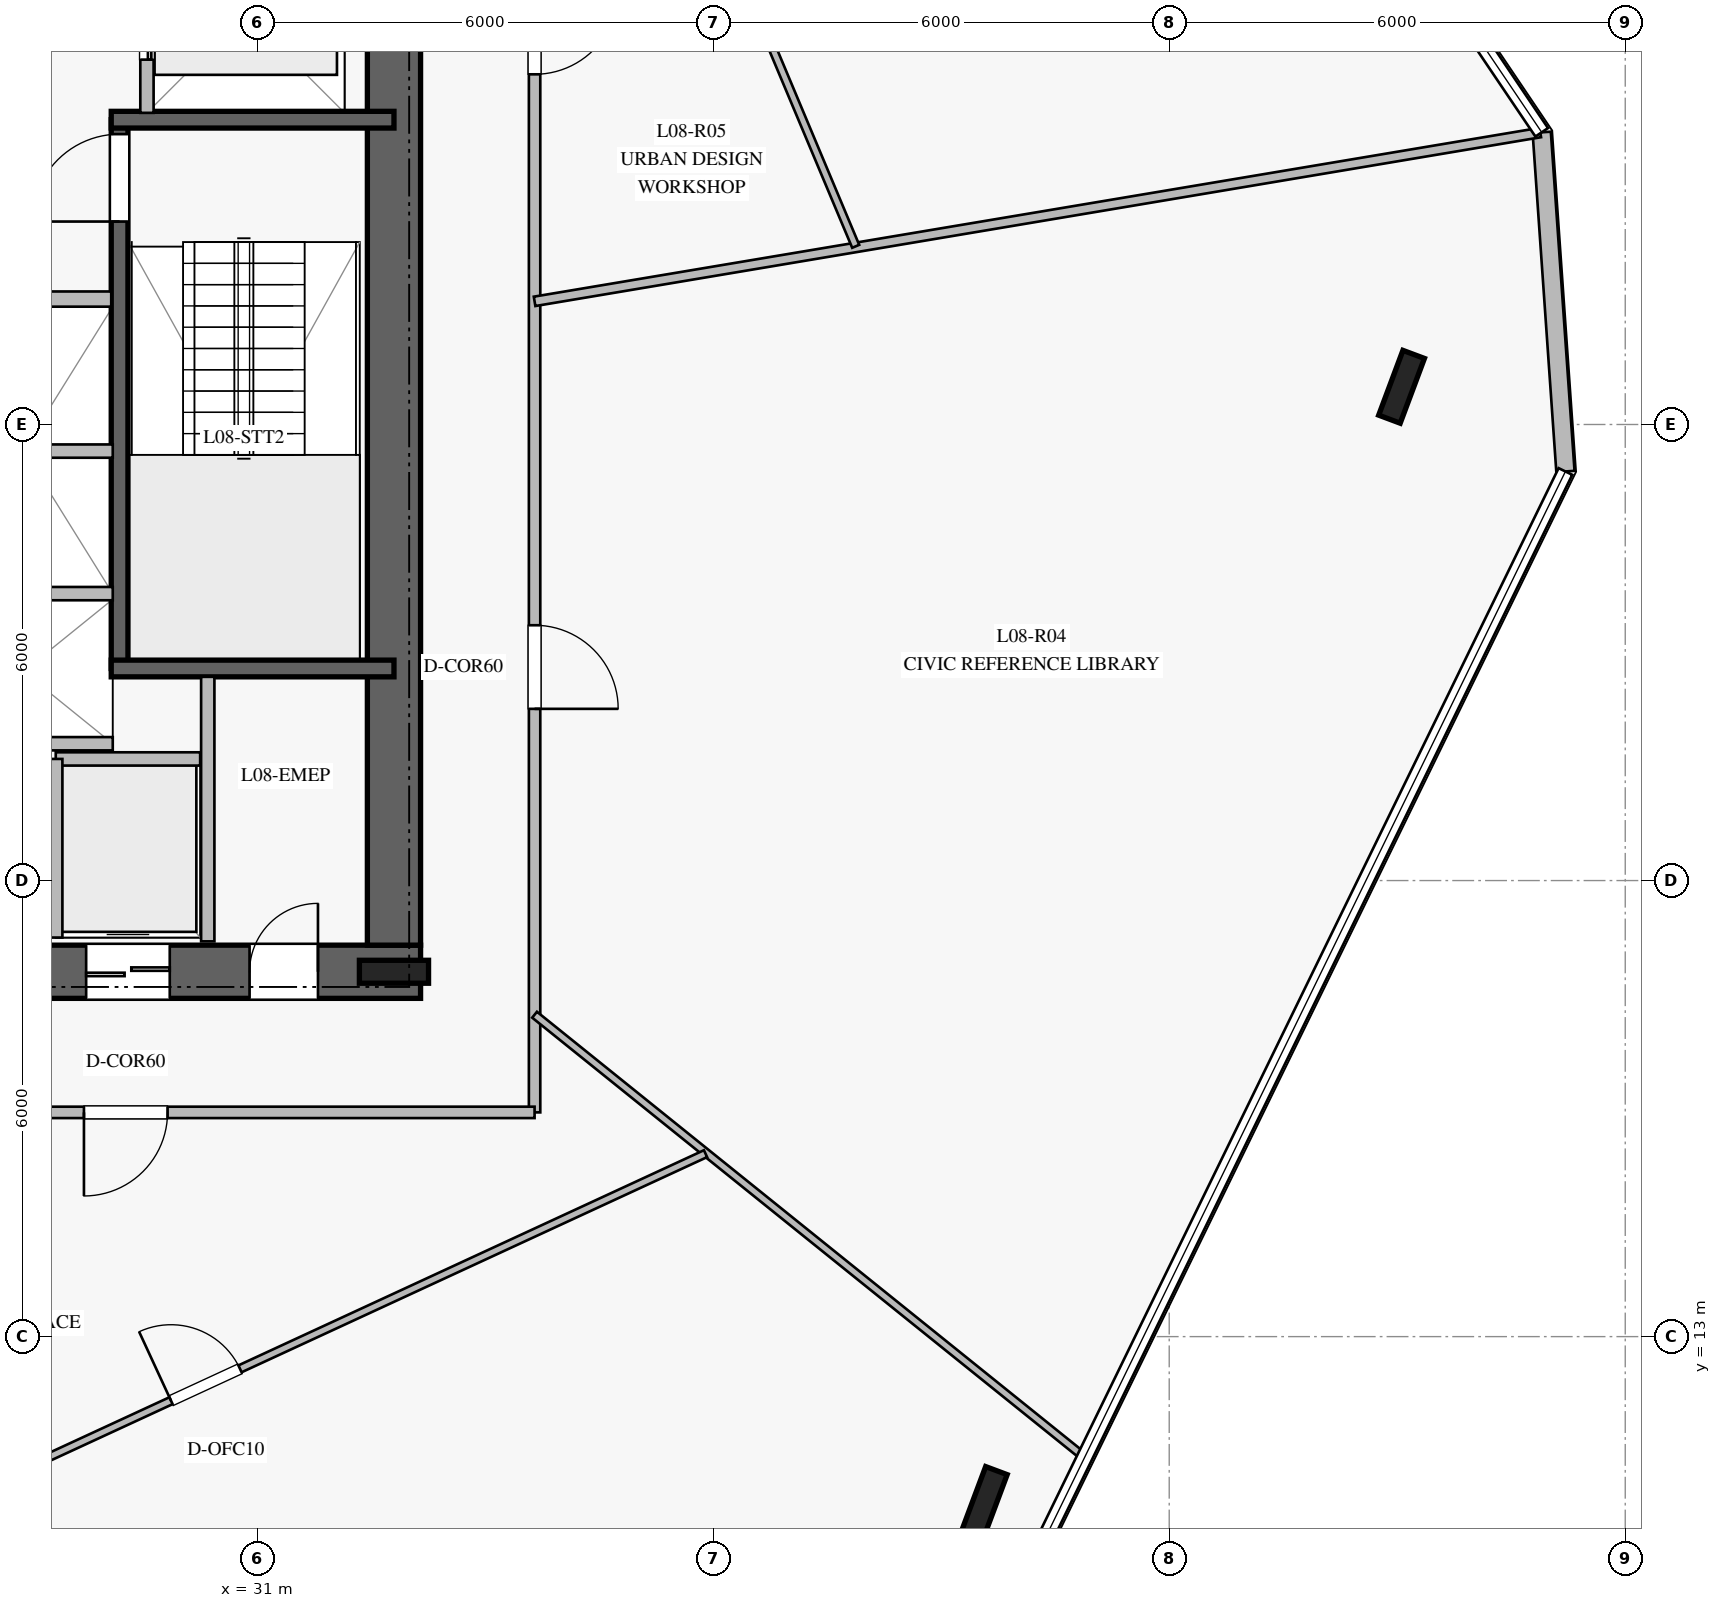
"""IFC4 building model, lengths in metres.
Left out: names, types, materials, properties, quantities, classifications, styles, units other than length and angle.
Written with IfcOpenShell. Run it as: python <this file> out.ifc"""

import sys

from ifc_helpers import new_model, si_unit, direction, frame, frame_2d, origin, origin_2d, place, context, subcontext, project, spatial, rectangle, i_section, extrude, element, fill, save


model = new_model("IFC4")
c1 = context("Model", 3, precision=1e-05, world=origin(), true_north=direction((0.0, 1.0)))
c2 = subcontext(c1, "Body", "Model", "MODEL_VIEW")
j1 = project(units=[si_unit("LENGTHUNIT", "METRE"), si_unit("PLANEANGLEUNIT", "RADIAN")], contexts=[c1])
p1 = place(None, origin())
s1 = spatial("IfcSite", under=j1, at=p1, CompositionType="ELEMENT")
p2 = place(p1, origin())
s2 = spatial("IfcBuilding", under=s1, at=p2, CompositionType="ELEMENT")
p3 = place(p2, frame((0.0, 0.0, 36.0)))
s3 = spatial("IfcBuildingStorey", under=s2, at=p3, CompositionType="ELEMENT", Elevation=36.0)
p4 = place(p3, frame((16.85, 17.8, 0.0), z_axis=(0.0, 0.0, 1.0), x_axis=(1.0, 0.0, 0.0)))
e1 = element("IfcWall", 1, at=p4, inside=s3, PredefinedType="SHEAR", context=c2, shape_type="SweptSolid", body=[
    extrude(rectangle(XDim=16.3, YDim=0.7, at=frame_2d((8.15, 0.0))), origin(), (0.0, 0.0, 1.0), 3.76),
])
p5 = place(p4, frame((5.1, 0.0, 0.0)))
e2 = element("IfcOpeningElement", 2, at=p5, cuts=e1, PredefinedType="OPENING", context=c2, shape_type="SweptSolid", body=[
    extrude(rectangle(XDim=1.2, YDim=2.25, at=frame_2d((0.6, 1.125))), frame((0.0, 0.36, 0.0), z_axis=(0.0, -1.0, 0.0), x_axis=(1.0, 0.0, 0.0)), (0.0, 0.0, 1.0), 0.72),
])
p6 = place(p4, frame((14.05, 0.0, 0.0)))
e3 = element("IfcOpeningElement", 3, at=p6, cuts=e1, PredefinedType="OPENING", context=c2, shape_type="SweptSolid", body=[
    extrude(rectangle(XDim=0.9, YDim=2.1, at=frame_2d((0.45, 1.05))), frame((0.0, 0.36, 0.0), z_axis=(0.0, -1.0, 0.0), x_axis=(1.0, 0.0, 0.0)), (0.0, 0.0, 1.0), 0.72),
])
p7 = place(p4, frame((7.95, 0.0, 0.0)))
e4 = element("IfcOpeningElement", 4, at=p7, cuts=e1, PredefinedType="OPENING", context=c2, shape_type="SweptSolid", body=[
    extrude(rectangle(XDim=1.1, YDim=2.2, at=frame_2d((0.55, 1.1))), frame((0.0, 0.36, 0.0), z_axis=(0.0, -1.0, 0.0), x_axis=(1.0, 0.0, 0.0)), (0.0, 0.0, 1.0), 0.72),
])
p8 = place(p4, frame((9.925, 0.0, 0.0)))
e5 = element("IfcOpeningElement", 5, at=p8, cuts=e1, PredefinedType="OPENING", context=c2, shape_type="SweptSolid", body=[
    extrude(rectangle(XDim=1.1, YDim=2.2, at=frame_2d((0.55, 1.1))), frame((0.0, 0.36, 0.0), z_axis=(0.0, -1.0, 0.0), x_axis=(1.0, 0.0, 0.0)), (0.0, 0.0, 1.0), 0.72),
])
p9 = place(p4, frame((11.9, 0.0, 0.0)))
e6 = element("IfcOpeningElement", 6, at=p9, cuts=e1, PredefinedType="OPENING", context=c2, shape_type="SweptSolid", body=[
    extrude(rectangle(XDim=1.1, YDim=2.2, at=frame_2d((0.55, 1.1))), frame((0.0, 0.36, 0.0), z_axis=(0.0, -1.0, 0.0), x_axis=(1.0, 0.0, 0.0)), (0.0, 0.0, 1.0), 0.72),
])
p10 = place(p3, frame((32.8, 18.15, 0.0), z_axis=(0.0, 0.0, 1.0), x_axis=(0.0, 1.0, 0.0)))
e7 = element("IfcWall", 7, at=p10, inside=s3, PredefinedType="SHEAR", context=c2, shape_type="SweptSolid", body=[
    extrude(rectangle(XDim=13.7, YDim=0.7, at=frame_2d((6.85, 0.0))), origin(), (0.0, 0.0, 1.0), 3.76),
])
p11 = place(p3, frame((32.8, 17.8, 0.0), z_axis=(0.0, 0.0, 1.0), x_axis=(1.0, 0.0, 0.0)))
e8 = element("IfcColumn", 8, at=p11, inside=s3, PredefinedType="COLUMN", context=c2, shape_type="SweptSolid", body=[
    extrude(i_section(OverallWidth=0.302, OverallDepth=0.91, WebThickness=0.021, FlangeThickness=0.04, at=origin_2d()), origin(), (0.0, 0.0, 1.0), 4.0),
])
p12 = place(p3, frame((29.19, 21.79, 0.0), z_axis=(0.0, 0.0, 1.0), x_axis=(0.0, 1.0, 0.0)))
e9 = element("IfcWall", 9, at=p12, inside=s3, PredefinedType="SOLIDWALL", context=c2, shape_type="SweptSolid", body=[
    extrude(rectangle(XDim=7.22, YDim=0.22, at=frame_2d((3.61, 0.0))), origin(), (0.0, 0.0, 1.0), 3.76),
])
p13 = place(p12, frame((5.88, 0.0, 0.0)))
e10 = element("IfcOpeningElement", 10, at=p13, cuts=e9, PredefinedType="OPENING", context=c2, shape_type="SweptSolid", body=[
    extrude(rectangle(XDim=1.15, YDim=2.2, at=frame_2d((0.575, 1.1))), frame((0.0, 0.12, 0.0), z_axis=(0.0, -1.0, 0.0), x_axis=(1.0, 0.0, 0.0)), (0.0, 0.0, 1.0), 0.24),
])
for number, where, z_axis, x_axis in (
    (11, (29.08, 21.79, 0.0), (0.0, 0.0, 1.0), (1.0, 0.0, 0.0)),
    (12, (29.08, 29.01, 0.0), (0.0, 0.0, 1.0), (1.0, 0.0, 0.0)),
):
    element("IfcWall", number, at=place(p3, frame(where, z_axis=z_axis, x_axis=x_axis)), inside=s3, PredefinedType="SOLIDWALL", context=c2, shape_type="SweptSolid", body=[
        extrude(rectangle(XDim=3.72, YDim=0.22, at=frame_2d((1.86, 0.0))), origin(), (0.0, 0.0, 1.0), 3.76),
    ])
for number, where, z_axis, x_axis in (
    (13, (40.567, 10.811, 0.0), (0.0, 0.0, 1.0), (0.35, 0.937, 0.0)),
    (14, (46.057, 25.496, 0.0), (0.0, 0.0, 1.0), (0.35, 0.937, 0.0)),
):
    element("IfcColumn", number, at=place(p3, frame(where, z_axis=z_axis, x_axis=x_axis)), inside=s3, PredefinedType="COLUMN", context=c2, shape_type="SweptSolid", body=[
        extrude(i_section(OverallWidth=0.302, OverallDepth=0.91, WebThickness=0.021, FlangeThickness=0.04, at=origin_2d()), origin(), (0.0, 0.0, 1.0), 4.0),
    ])
p14 = place(p3, frame((48.213, 24.382, 0.0), z_axis=(0.0, 0.0, 1.0), x_axis=(-0.069757428916, 0.997563983467, 0.0)))
e15 = element("IfcWall", 15, at=p14, inside=s3, PredefinedType="STANDARD", context=c2, shape_type="SweptSolid", body=[
    extrude(rectangle(XDim=4.473, YDim=0.24, at=frame_2d((2.236, 0.0))), origin(), (0.0, 0.0, 1.0), 3.76),
])
p15 = place(p3, frame((25.7, 26.65, 0.0), z_axis=(0.0, 0.0, 1.0), x_axis=(1.0, 0.0, 0.0)))
e16 = element("IfcWall", 16, at=p15, inside=s3, PredefinedType="PARTITIONING", context=c2, shape_type="SweptSolid", body=[
    extrude(rectangle(XDim=3.38, YDim=0.2, at=frame_2d((1.69, 0.0))), origin(), (0.0, 0.0, 1.0), 3.76),
])
p16 = place(p3, frame((30.35, 18.2, 0.0), z_axis=(0.0, 0.0, 1.0), x_axis=(0.0, 1.0, 0.0)))
e17 = element("IfcWall", 17, at=p16, inside=s3, PredefinedType="PARTITIONING", context=c2, shape_type="SweptSolid", body=[
    extrude(rectangle(XDim=3.48, YDim=0.175, at=frame_2d((1.74, 0.0))), origin(), (0.0, 0.0, 1.0), 3.76),
])
p17 = place(p3, frame((28.35, 20.6, 0.0), z_axis=(0.0, 0.0, 1.0), x_axis=(1.0, 0.0, 0.0)))
e18 = element("IfcWall", 18, at=p17, inside=s3, PredefinedType="PARTITIONING", context=c2, shape_type="SweptSolid", body=[
    extrude(rectangle(XDim=1.9, YDim=0.175, at=frame_2d((0.95, 0.0))), origin(), (0.0, 0.0, 1.0), 3.76),
])
for number, where, z_axis, x_axis in (
    (19, (28.35, 18.25, 0.0), (0.0, 0.0, 1.0), (0.0, 1.0, 0.0)),
    (20, (26.75, 20.8, 0.0), (0.0, 0.0, 1.0), (1.0, 0.0, 0.0)),
    (21, (26.75, 22.775, 0.0), (0.0, 0.0, 1.0), (1.0, 0.0, 0.0)),
    (22, (26.75, 24.65, 0.0), (0.0, 0.0, 1.0), (1.0, 0.0, 0.0)),
):
    element("IfcWall", number, at=place(p3, frame(where, z_axis=z_axis, x_axis=x_axis)), inside=s3, PredefinedType="PARTITIONING", context=c2, shape_type="SweptSolid", body=[
        extrude(rectangle(XDim=2.35, YDim=0.175, at=frame_2d((1.175, 0.0))), origin(), (0.0, 0.0, 1.0), 3.76),
    ])
p18 = place(p3, frame((29.55, 29.1, 0.0), z_axis=(0.0, 0.0, 1.0), x_axis=(0.0, 1.0, 0.0)))
e23 = element("IfcWall", 23, at=p18, inside=s3, PredefinedType="PARTITIONING", context=c2, shape_type="SweptSolid", body=[
    extrude(rectangle(XDim=2.6, YDim=0.175, at=frame_2d((1.3, 0.0))), origin(), (0.0, 0.0, 1.0), 3.76),
])
p19 = place(p18, frame((0.7, 0.0, 0.0)))
e24 = element("IfcOpeningElement", 24, at=p19, cuts=e23, PredefinedType="OPENING", context=c2, shape_type="SweptSolid", body=[
    extrude(rectangle(XDim=1.2, YDim=2.2, at=frame_2d((0.6, 1.1))), frame((0.0, 0.098, 0.0), z_axis=(0.0, -1.0, 0.0), x_axis=(1.0, 0.0, 0.0)), (0.0, 0.0, 1.0), 0.195),
])
p20 = place(p3, frame((34.65, 34.05, 0.0), z_axis=(0.0, 0.0, 1.0), x_axis=(0.0, -1.0, 0.0)))
e25 = element("IfcWall", 25, at=p20, inside=s3, PredefinedType="PARTITIONING", context=c2, shape_type="SweptSolid", body=[
    extrude(rectangle(XDim=18.1, YDim=0.15, at=frame_2d((9.05, 0.0))), origin(), (0.0, 0.0, 1.0), 3.21),
])
p21 = place(p20, frame((11.691, 0.0, 0.0)))
e26 = element("IfcOpeningElement", 26, at=p21, cuts=e25, PredefinedType="OPENING", context=c2, shape_type="SweptSolid", body=[
    extrude(rectangle(XDim=1.1, YDim=2.2, at=frame_2d((0.55, 1.1))), frame((0.0, 0.085, 0.0), z_axis=(0.0, -1.0, 0.0), x_axis=(1.0, 0.0, 0.0)), (0.0, 0.0, 1.0), 0.17),
])
p22 = place(p20, frame((3.343, 0.0, 0.0)))
e27 = element("IfcOpeningElement", 27, at=p22, cuts=e25, PredefinedType="OPENING", context=c2, shape_type="SweptSolid", body=[
    extrude(rectangle(XDim=1.1, YDim=2.2, at=frame_2d((0.55, 1.1))), frame((0.0, 0.085, 0.0), z_axis=(0.0, -1.0, 0.0), x_axis=(1.0, 0.0, 0.0)), (0.0, 0.0, 1.0), 0.17),
])
p23 = place(p3, frame((34.65, 15.95, 0.0), z_axis=(0.0, 0.0, 1.0), x_axis=(-1.0, 0.0, 0.0)))
e28 = element("IfcWall", 28, at=p23, inside=s3, PredefinedType="PARTITIONING", context=c2, shape_type="SweptSolid", body=[
    extrude(rectangle(XDim=19.3, YDim=0.15, at=frame_2d((9.65, 0.0))), origin(), (0.0, 0.0, 1.0), 3.21),
])
p24 = place(p23, frame((14.112, 0.0, 0.0)))
e29 = element("IfcOpeningElement", 29, at=p24, cuts=e28, PredefinedType="OPENING", context=c2, shape_type="SweptSolid", body=[
    extrude(rectangle(XDim=1.1, YDim=2.2, at=frame_2d((0.55, 1.1))), frame((0.0, 0.085, 0.0), z_axis=(0.0, -1.0, 0.0), x_axis=(1.0, 0.0, 0.0)), (0.0, 0.0, 1.0), 0.17),
])
p25 = place(p23, frame((4.829, 0.0, 0.0)))
e30 = element("IfcOpeningElement", 30, at=p25, cuts=e28, PredefinedType="OPENING", context=c2, shape_type="SweptSolid", body=[
    extrude(rectangle(XDim=1.1, YDim=2.2, at=frame_2d((0.55, 1.1))), frame((0.0, 0.085, 0.0), z_axis=(0.0, -1.0, 0.0), x_axis=(1.0, 0.0, 0.0)), (0.0, 0.0, 1.0), 0.17),
])
p26 = place(p3, frame((34.65, 17.235, 0.0), z_axis=(0.0, 0.0, 1.0), x_axis=(0.779103283346, -0.626895584511, 0.0)))
e31 = element("IfcWall", 31, at=p26, inside=s3, PredefinedType="MOVABLE", context=c2, shape_type="SweptSolid", body=[
    extrude(rectangle(XDim=9.271, YDim=0.1, at=frame_2d((4.635, 0.0))), origin(), (0.0, 0.0, 1.0), 3.06),
])
p27 = place(p3, frame((34.65, 26.62, 0.0), z_axis=(0.0, 0.0, 1.0), x_axis=(0.986204923265, 0.165528998449, 0.0)))
e32 = element("IfcWall", 32, at=p27, inside=s3, PredefinedType="PARTITIONING", context=c2, shape_type="SweptSolid", body=[
    extrude(rectangle(XDim=13.417, YDim=0.125, at=frame_2d((6.708, 0.0))), origin(), (0.0, 0.0, 1.0), 3.06),
])
p28 = place(p3, frame((23.742, 9.326, 0.0), z_axis=(0.0, 0.0, 1.0), x_axis=(0.907733462567, 0.419547328601, 0.0)))
e33 = element("IfcWall", 33, at=p28, inside=s3, PredefinedType="MOVABLE", context=c2, shape_type="SweptSolid", body=[
    extrude(rectangle(XDim=14.494, YDim=0.1, at=frame_2d((7.247, 0.0))), origin(), (0.0, 0.0, 1.0), 3.05),
])
p29 = place(p28, frame((6.747, 0.0, 0.0)))
e34 = element("IfcOpeningElement", 34, at=p29, cuts=e33, PredefinedType="OPENING", context=c2, shape_type="SweptSolid", body=[
    extrude(rectangle(XDim=1.0, YDim=2.15, at=frame_2d((0.5, 1.075))), frame((0.0, 0.06, 0.0), z_axis=(0.0, -1.0, 0.0), x_axis=(1.0, 0.0, 0.0)), (0.0, 0.0, 1.0), 0.12),
])
p30 = place(p3, frame((38.875, 27.344, 0.0), z_axis=(0.0, 0.0, 1.0), x_axis=(-0.387303850875, 0.92195212842, 0.0)))
e35 = element("IfcWall", 35, at=p30, inside=s3, PredefinedType="MOVABLE", context=c2, shape_type="SweptSolid", body=[
    extrude(rectangle(XDim=9.305, YDim=0.1, at=frame_2d((4.653, 0.0))), origin(), (0.0, 0.0, 1.0), 3.21),
])
p31 = place(p30, frame((4.241, 0.0, 0.0)))
e36 = element("IfcOpeningElement", 36, at=p31, cuts=e35, PredefinedType="OPENING", context=c2, shape_type="SweptSolid", body=[
    extrude(rectangle(XDim=1.0, YDim=2.15, at=frame_2d((0.5, 1.075))), frame((0.0, 0.06, 0.0), z_axis=(0.0, -1.0, 0.0), x_axis=(1.0, 0.0, 0.0)), (0.0, 0.0, 1.0), 0.12),
])
p32 = place(p13, origin())
e37 = element("IfcDoor", 37, at=p32, inside=s3, OperationType="SINGLE_SWING_LEFT", PredefinedType="DOOR", context=c2, shape_type="SweptSolid", body=[
    extrude(rectangle(XDim=1.15, YDim=2.2, at=frame_2d((0.575, 1.1))), frame((0.0, 0.025, 0.0), z_axis=(0.0, -1.0, 0.0), x_axis=(1.0, 0.0, 0.0)), (0.0, 0.0, 1.0), 0.05),
])
fill(e10, e37)
p33 = place(p6, origin())
e38 = element("IfcDoor", 38, at=p33, inside=s3, OperationType="SINGLE_SWING_RIGHT", PredefinedType="DOOR", context=c2, shape_type="SweptSolid", body=[
    extrude(rectangle(XDim=0.9, YDim=2.1, at=frame_2d((0.45, 1.05))), frame((0.0, 0.025, 0.0), z_axis=(0.0, -1.0, 0.0), x_axis=(1.0, 0.0, 0.0)), (0.0, 0.0, 1.0), 0.05),
])
fill(e3, e38)
p34 = place(p9, origin())
e39 = element("IfcDoor", 39, at=p34, inside=s3, OperationType="DOUBLE_DOOR_SLIDING", PredefinedType="DOOR", context=c2, shape_type="SweptSolid", body=[
    extrude(rectangle(XDim=1.1, YDim=2.2, at=frame_2d((0.55, 1.1))), frame((0.0, 0.025, 0.0), z_axis=(0.0, -1.0, 0.0), x_axis=(1.0, 0.0, 0.0)), (0.0, 0.0, 1.0), 0.05),
])
fill(e6, e39)
p35 = place(p19, origin())
e40 = element("IfcDoor", 40, at=p35, inside=s3, OperationType="DOUBLE_DOOR_SLIDING", PredefinedType="DOOR", context=c2, shape_type="SweptSolid", body=[
    extrude(rectangle(XDim=1.2, YDim=2.2, at=frame_2d((0.6, 1.1))), frame((0.0, 0.025, 0.0), z_axis=(0.0, -1.0, 0.0), x_axis=(1.0, 0.0, 0.0)), (0.0, 0.0, 1.0), 0.05),
])
fill(e24, e40)
p36 = place(p25, origin())
e41 = element("IfcDoor", 41, at=p36, inside=s3, OperationType="SINGLE_SWING_RIGHT", PredefinedType="DOOR", context=c2, shape_type="SweptSolid", body=[
    extrude(rectangle(XDim=1.1, YDim=2.2, at=frame_2d((0.55, 1.1))), frame((0.0, 0.025, 0.0), z_axis=(0.0, -1.0, 0.0), x_axis=(1.0, 0.0, 0.0)), (0.0, 0.0, 1.0), 0.05),
])
fill(e30, e41)
p37 = place(p29, origin())
e42 = element("IfcDoor", 42, at=p37, inside=s3, OperationType="SINGLE_SWING_LEFT", PredefinedType="DOOR", context=c2, shape_type="SweptSolid", body=[
    extrude(rectangle(XDim=1.0, YDim=2.15, at=frame_2d((0.5, 1.075))), frame((0.0, 0.025, 0.0), z_axis=(0.0, -1.0, 0.0), x_axis=(1.0, 0.0, 0.0)), (0.0, 0.0, 1.0), 0.05),
])
fill(e34, e42)
p38 = place(p21, origin())
e43 = element("IfcDoor", 43, at=p38, inside=s3, OperationType="SINGLE_SWING_RIGHT", PredefinedType="DOOR", context=c2, shape_type="SweptSolid", body=[
    extrude(rectangle(XDim=1.1, YDim=2.2, at=frame_2d((0.55, 1.1))), frame((0.0, 0.025, 0.0), z_axis=(0.0, -1.0, 0.0), x_axis=(1.0, 0.0, 0.0)), (0.0, 0.0, 1.0), 0.05),
])
fill(e26, e43)
p39 = place(p22, origin())
e44 = element("IfcDoor", 44, at=p39, inside=s3, OperationType="SINGLE_SWING_LEFT", PredefinedType="DOOR", context=c2, shape_type="SweptSolid", body=[
    extrude(rectangle(XDim=1.1, YDim=2.2, at=frame_2d((0.55, 1.1))), frame((0.0, 0.025, 0.0), z_axis=(0.0, -1.0, 0.0), x_axis=(1.0, 0.0, 0.0)), (0.0, 0.0, 1.0), 0.05),
])
fill(e27, e44)
save(model, sys.argv[1])
